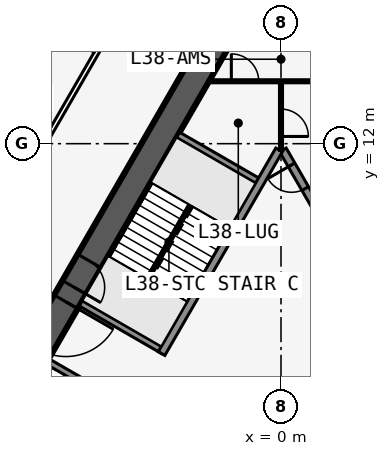
"""IFC4 building model, lengths in metres.
Left out: names, types, materials, properties, quantities, classifications, styles, units other than length and angle.
Written with IfcOpenShell. Run it as: python <this file> out.ifc"""

import sys

from ifc_helpers import new_model, si_unit, direction, frame, frame_2d, origin, place, context, subcontext, project, spatial, rectangle, extrude, element, fill, save


model = new_model("IFC4")
c1 = context("Model", 3, precision=1e-05, world=origin(), true_north=direction((0.0, 1.0)))
c2 = subcontext(c1, "Body", "Model", "MODEL_VIEW")
j1 = project(units=[si_unit("LENGTHUNIT", "METRE"), si_unit("PLANEANGLEUNIT", "RADIAN")], contexts=[c1])
p1 = place(None, origin())
s1 = spatial("IfcSite", under=j1, at=p1, CompositionType="ELEMENT")
p2 = place(p1, origin())
s2 = spatial("IfcBuilding", under=s1, at=p2, CompositionType="ELEMENT")
p3 = place(p2, frame((0.0, 0.0, 145.3)))
s3 = spatial("IfcBuildingStorey", under=s2, at=p3, CompositionType="ELEMENT", Elevation=145.3)
p4 = place(p3, frame((16.5, -9.526, 0.0), z_axis=(0.0, 0.0, 1.0), x_axis=(-0.499999749417, 0.866025548458, 0.0)))
e1 = element("IfcWall", 1, at=p4, inside=s3, PredefinedType="SHEAR", context=c2, shape_type="SweptSolid", body=[
    extrude(rectangle(XDim=33.0, YDim=0.9, at=frame_2d((16.5, 0.0))), origin(), (0.0, 0.0, 1.0), 3.4),
])
p5 = place(p4, frame((14.15, 0.0, 0.0)))
e2 = element("IfcOpeningElement", 2, at=p5, cuts=e1, PredefinedType="OPENING", context=c2, shape_type="SweptSolid", body=[
    extrude(rectangle(XDim=1.8, YDim=2.13, at=frame_2d((0.9, 1.065))), frame((0.0, 0.46, 0.0), z_axis=(0.0, -1.0, 0.0), x_axis=(1.0, 0.0, 0.0)), (0.0, 0.0, 1.0), 0.92),
])
p6 = place(p4, frame((12.6, 0.0, 0.0)))
e3 = element("IfcOpeningElement", 3, at=p6, cuts=e1, PredefinedType="OPENING", context=c2, shape_type="SweptSolid", body=[
    extrude(rectangle(XDim=1.0, YDim=2.13, at=frame_2d((0.5, 1.065))), frame((0.0, 0.46, 0.0), z_axis=(0.0, -1.0, 0.0), x_axis=(1.0, 0.0, 0.0)), (0.0, 0.0, 1.0), 0.92),
])
p7 = place(p3, frame((5.379, 2.586, 0.0), z_axis=(0.0, 0.0, 1.0), x_axis=(-0.500001375892, 0.866024609411, 0.0)))
e4 = element("IfcWall", 4, at=p7, inside=s3, PredefinedType="SOLIDWALL", context=c2, shape_type="SweptSolid", body=[
    extrude(rectangle(XDim=10.633, YDim=0.25, at=frame_2d((5.316, 0.0))), origin(), (0.0, 0.0, 1.0), 3.235),
])
p8 = place(p7, frame((9.164, 0.0, 0.0)))
e5 = element("IfcOpeningElement", 5, at=p8, cuts=e4, PredefinedType="OPENING", context=c2, shape_type="SweptSolid", body=[
    extrude(rectangle(XDim=0.9, YDim=2.13, at=frame_2d((0.45, 1.065))), frame((0.0, 0.135, 0.0), z_axis=(0.0, -1.0, 0.0), x_axis=(1.0, 0.0, 0.0)), (0.0, 0.0, 1.0), 0.27),
])
p9 = place(p7, frame((1.0, 0.0, 0.0)))
e6 = element("IfcOpeningElement", 6, at=p9, cuts=e4, PredefinedType="OPENING", context=c2, shape_type="SweptSolid", body=[
    extrude(rectangle(XDim=1.1, YDim=2.13, at=frame_2d((0.55, 1.065))), frame((0.0, 0.135, 0.0), z_axis=(0.0, -1.0, 0.0), x_axis=(1.0, 0.0, 0.0)), (0.0, 0.0, 1.0), 0.27),
])
p10 = place(p7, frame((3.9, 0.0, 0.0)))
e7 = element("IfcOpeningElement", 7, at=p10, cuts=e4, PredefinedType="OPENING", context=c2, shape_type="SweptSolid", body=[
    extrude(rectangle(XDim=1.1, YDim=2.13, at=frame_2d((0.55, 1.065))), frame((0.0, 0.135, 0.0), z_axis=(0.0, -1.0, 0.0), x_axis=(1.0, 0.0, 0.0)), (0.0, 0.0, 1.0), 0.27),
])
p11 = place(p7, frame((6.8, 0.0, 0.0)))
e8 = element("IfcOpeningElement", 8, at=p11, cuts=e4, PredefinedType="OPENING", context=c2, shape_type="SweptSolid", body=[
    extrude(rectangle(XDim=1.1, YDim=2.13, at=frame_2d((0.55, 1.065))), frame((0.0, 0.135, 0.0), z_axis=(0.0, -1.0, 0.0), x_axis=(1.0, 0.0, 0.0)), (0.0, 0.0, 1.0), 0.27),
])
p12 = place(p3, frame((0.979, 10.207, 0.0), z_axis=(0.0, 0.0, 1.0), x_axis=(0.866022959057, 0.500004234368, 0.0)))
e9 = element("IfcWall", 9, at=p12, inside=s3, PredefinedType="SOLIDWALL", context=c2, shape_type="SweptSolid", body=[
    extrude(rectangle(XDim=3.125, YDim=0.2, at=frame_2d((1.562, 0.0))), origin(), (0.0, 0.0, 1.0), 3.235),
])
p13 = place(p3, frame((0.0, 19.052, 0.0), z_axis=(0.0, 0.0, 1.0), x_axis=(-0.499999749417, -0.866025548458, 0.0)))
e10 = element("IfcWall", 10, at=p13, inside=s3, PredefinedType="SHEAR", context=c2, shape_type="SweptSolid", body=[
    extrude(rectangle(XDim=33.0, YDim=0.9, at=frame_2d((16.5, 0.0))), origin(), (0.0, 0.0, 1.0), 3.4),
])
p14 = place(p13, frame((14.15, 0.0, 0.0)))
e11 = element("IfcOpeningElement", 11, at=p14, cuts=e10, PredefinedType="OPENING", context=c2, shape_type="SweptSolid", body=[
    extrude(rectangle(XDim=1.8, YDim=2.13, at=frame_2d((0.9, 1.065))), frame((0.0, 0.46, 0.0), z_axis=(0.0, -1.0, 0.0), x_axis=(1.0, 0.0, 0.0)), (0.0, 0.0, 1.0), 0.92),
])
p15 = place(p13, frame((12.6, 0.0, 0.0)))
e12 = element("IfcOpeningElement", 12, at=p15, cuts=e10, PredefinedType="OPENING", context=c2, shape_type="SweptSolid", body=[
    extrude(rectangle(XDim=1.0, YDim=2.13, at=frame_2d((0.5, 1.065))), frame((0.0, 0.46, 0.0), z_axis=(0.0, -1.0, 0.0), x_axis=(1.0, 0.0, 0.0)), (0.0, 0.0, 1.0), 0.92),
])
p16 = place(p3, frame((-0.062, 11.794, 0.0), z_axis=(0.0, 0.0, 1.0), x_axis=(-0.500006680225, -0.86602154692, 0.0)))
e13 = element("IfcWall", 13, at=p16, inside=s3, PredefinedType="SOLIDWALL", context=c2, shape_type="SweptSolid", body=[
    extrude(rectangle(XDim=7.733, YDim=0.25, at=frame_2d((3.866, 0.0))), origin(), (0.0, 0.0, 1.0), 3.235),
])
for number, where, z_axis, x_axis in (
    (14, (-0.679, 10.727, 0.0), (0.0, 0.0, 1.0), (-0.866, 0.5, 0.0)),
    (15, (-3.879, 5.184, 0.0), (0.0, 0.0, 1.0), (-0.866, 0.5, 0.0)),
    (16, (-4.979, 3.279, 0.0), (0.0, 0.0, 1.0), (-0.866, 0.5, 0.0)),
):
    element("IfcWall", number, at=place(p3, frame(where, z_axis=z_axis, x_axis=x_axis)), inside=s3, PredefinedType="SOLIDWALL", context=c2, shape_type="SweptSolid", body=[
        extrude(rectangle(XDim=3.125, YDim=0.2, at=frame_2d((1.562, 0.0))), origin(), (0.0, 0.0, 1.0), 3.235),
    ])
p17 = place(p3, frame((20.027, -10.985, 0.0), z_axis=(0.0, 0.0, 1.0), x_axis=(-0.500001677587, 0.866024435227, 0.0)))
e17 = element("IfcWall", 17, at=p17, inside=s3, PredefinedType="PARTITIONING", context=c2, shape_type="SweptSolid", body=[
    extrude(rectangle(XDim=39.054, YDim=0.15, at=frame_2d((19.527, 0.0))), origin(), (0.0, 0.0, 1.0), 3.235),
])
p18 = place(p17, frame((0.352, 0.0, 0.0)))
e18 = element("IfcOpeningElement", 18, at=p18, cuts=e17, PredefinedType="OPENING", context=c2, shape_type="SweptSolid", body=[
    extrude(rectangle(XDim=0.95, YDim=2.13, at=frame_2d((0.475, 1.065))), frame((0.0, 0.085, 0.0), z_axis=(0.0, -1.0, 0.0), x_axis=(1.0, 0.0, 0.0)), (0.0, 0.0, 1.0), 0.17),
])
p19 = place(p17, frame((6.552, 0.0, 0.0)))
e19 = element("IfcOpeningElement", 19, at=p19, cuts=e17, PredefinedType="OPENING", context=c2, shape_type="SweptSolid", body=[
    extrude(rectangle(XDim=0.95, YDim=2.13, at=frame_2d((0.475, 1.065))), frame((0.0, 0.085, 0.0), z_axis=(0.0, -1.0, 0.0), x_axis=(1.0, 0.0, 0.0)), (0.0, 0.0, 1.0), 0.17),
])
p20 = place(p17, frame((17.152, 0.0, 0.0)))
e20 = element("IfcOpeningElement", 20, at=p20, cuts=e17, PredefinedType="OPENING", context=c2, shape_type="SweptSolid", body=[
    extrude(rectangle(XDim=0.95, YDim=2.13, at=frame_2d((0.475, 1.065))), frame((0.0, 0.085, 0.0), z_axis=(0.0, -1.0, 0.0), x_axis=(1.0, 0.0, 0.0)), (0.0, 0.0, 1.0), 0.17),
])
p21 = place(p17, frame((21.552, 0.0, 0.0)))
e21 = element("IfcOpeningElement", 21, at=p21, cuts=e17, PredefinedType="OPENING", context=c2, shape_type="SweptSolid", body=[
    extrude(rectangle(XDim=0.95, YDim=2.13, at=frame_2d((0.475, 1.065))), frame((0.0, 0.085, 0.0), z_axis=(0.0, -1.0, 0.0), x_axis=(1.0, 0.0, 0.0)), (0.0, 0.0, 1.0), 0.17),
])
p22 = place(p17, frame((32.152, 0.0, 0.0)))
e22 = element("IfcOpeningElement", 22, at=p22, cuts=e17, PredefinedType="OPENING", context=c2, shape_type="SweptSolid", body=[
    extrude(rectangle(XDim=0.95, YDim=2.13, at=frame_2d((0.475, 1.065))), frame((0.0, 0.085, 0.0), z_axis=(0.0, -1.0, 0.0), x_axis=(1.0, 0.0, 0.0)), (0.0, 0.0, 1.0), 0.17),
])
p23 = place(p17, frame((37.752, 0.0, 0.0)))
e23 = element("IfcOpeningElement", 23, at=p23, cuts=e17, PredefinedType="OPENING", context=c2, shape_type="SweptSolid", body=[
    extrude(rectangle(XDim=0.95, YDim=2.13, at=frame_2d((0.475, 1.065))), frame((0.0, 0.085, 0.0), z_axis=(0.0, -1.0, 0.0), x_axis=(1.0, 0.0, 0.0)), (0.0, 0.0, 1.0), 0.17),
])
p24 = place(p3, frame((-0.5, 24.636, 0.0), z_axis=(0.0, 0.0, 1.0), x_axis=(-0.500001915564, -0.86602429783, 0.0)))
e24 = element("IfcWall", 24, at=p24, inside=s3, PredefinedType="PARTITIONING", context=c2, shape_type="SweptSolid", body=[
    extrude(rectangle(XDim=42.172, YDim=0.15, at=frame_2d((21.086, 0.0))), origin(), (0.0, 0.0, 1.0), 3.235),
])
p25 = place(p24, frame((1.911, 0.0, 0.0)))
e25 = element("IfcOpeningElement", 25, at=p25, cuts=e24, PredefinedType="OPENING", context=c2, shape_type="SweptSolid", body=[
    extrude(rectangle(XDim=0.95, YDim=2.13, at=frame_2d((0.475, 1.065))), frame((0.0, 0.085, 0.0), z_axis=(0.0, -1.0, 0.0), x_axis=(1.0, 0.0, 0.0)), (0.0, 0.0, 1.0), 0.17),
])
p26 = place(p24, frame((9.311, 0.0, 0.0)))
e26 = element("IfcOpeningElement", 26, at=p26, cuts=e24, PredefinedType="OPENING", context=c2, shape_type="SweptSolid", body=[
    extrude(rectangle(XDim=0.95, YDim=2.13, at=frame_2d((0.475, 1.065))), frame((0.0, 0.085, 0.0), z_axis=(0.0, -1.0, 0.0), x_axis=(1.0, 0.0, 0.0)), (0.0, 0.0, 1.0), 0.17),
])
p27 = place(p24, frame((18.111, 0.0, 0.0)))
e27 = element("IfcOpeningElement", 27, at=p27, cuts=e24, PredefinedType="OPENING", context=c2, shape_type="SweptSolid", body=[
    extrude(rectangle(XDim=0.95, YDim=2.13, at=frame_2d((0.475, 1.065))), frame((0.0, 0.085, 0.0), z_axis=(0.0, -1.0, 0.0), x_axis=(1.0, 0.0, 0.0)), (0.0, 0.0, 1.0), 0.17),
])
p28 = place(p24, frame((29.311, 0.0, 0.0)))
e28 = element("IfcOpeningElement", 28, at=p28, cuts=e24, PredefinedType="OPENING", context=c2, shape_type="SweptSolid", body=[
    extrude(rectangle(XDim=0.95, YDim=2.13, at=frame_2d((0.475, 1.065))), frame((0.0, 0.085, 0.0), z_axis=(0.0, -1.0, 0.0), x_axis=(1.0, 0.0, 0.0)), (0.0, 0.0, 1.0), 0.17),
])
p29 = place(p24, frame((39.311, 0.0, 0.0)))
e29 = element("IfcOpeningElement", 29, at=p29, cuts=e24, PredefinedType="OPENING", context=c2, shape_type="SweptSolid", body=[
    extrude(rectangle(XDim=0.95, YDim=2.13, at=frame_2d((0.475, 1.065))), frame((0.0, 0.085, 0.0), z_axis=(0.0, -1.0, 0.0), x_axis=(1.0, 0.0, 0.0)), (0.0, 0.0, 1.0), 0.17),
])
p30 = place(p3, frame((-2.367, 14.052, 0.0), z_axis=(0.0, 0.0, 1.0), x_axis=(1.0, 0.0, 0.0)))
e30 = element("IfcWall", 30, at=p30, inside=s3, PredefinedType="PARTITIONING", context=c2, shape_type="SweptSolid", body=[
    extrude(rectangle(XDim=4.734, YDim=0.1, at=frame_2d((2.367, 0.0))), origin(), (0.0, 0.0, 1.0), 3.235),
])
p31 = place(p30, frame((0.734, 0.0, 0.0)))
e31 = element("IfcOpeningElement", 31, at=p31, cuts=e30, PredefinedType="OPENING", context=c2, shape_type="SweptSolid", body=[
    extrude(rectangle(XDim=0.9, YDim=2.13, at=frame_2d((0.45, 1.065))), frame((0.0, 0.06, 0.0), z_axis=(0.0, -1.0, 0.0), x_axis=(1.0, 0.0, 0.0)), (0.0, 0.0, 1.0), 0.12),
])
p32 = place(p3, frame((0.0, 14.052, 0.0), z_axis=(0.0, 0.0, 1.0), x_axis=(0.0, -1.0, 0.0)))
e32 = element("IfcWall", 32, at=p32, inside=s3, PredefinedType="PARTITIONING", context=c2, shape_type="SweptSolid", body=[
    extrude(rectangle(XDim=2.275, YDim=0.1, at=frame_2d((1.138, 0.0))), origin(), (0.0, 0.0, 1.0), 3.235),
])
p33 = place(p32, frame((0.915, 0.0, 0.0)))
e33 = element("IfcOpeningElement", 33, at=p33, cuts=e32, PredefinedType="OPENING", context=c2, shape_type="SweptSolid", body=[
    extrude(rectangle(XDim=0.9, YDim=2.13, at=frame_2d((0.45, 1.065))), frame((0.0, 0.06, 0.0), z_axis=(0.0, -1.0, 0.0), x_axis=(1.0, 0.0, 0.0)), (0.0, 0.0, 1.0), 0.12),
])
p34 = place(p3, frame((-2.988, 9.978, 0.0), z_axis=(0.0, 0.0, 1.0), x_axis=(-0.499992232847, -0.866029888106, 0.0)))
e34 = element("IfcWall", 34, at=p34, inside=s3, PredefinedType="SOLIDWALL", context=c2, shape_type="SweptSolid", body=[
    extrude(rectangle(XDim=2.794, YDim=0.1, at=frame_2d((1.397, 0.0))), origin(), (0.0, 0.0, 1.0), 3.4),
])
p35 = place(p14, origin())
e35 = element("IfcDoor", 35, at=p35, inside=s3, OperationType="DOUBLE_DOOR_SINGLE_SWING", PredefinedType="DOOR", context=c2, shape_type="SweptSolid", body=[
    extrude(rectangle(XDim=1.8, YDim=2.13, at=frame_2d((0.9, 1.065))), frame((0.0, 0.025, 0.0), z_axis=(0.0, -1.0, 0.0), x_axis=(1.0, 0.0, 0.0)), (0.0, 0.0, 1.0), 0.05),
])
fill(e11, e35)
p36 = place(p15, origin())
e36 = element("IfcDoor", 36, at=p36, inside=s3, OperationType="SINGLE_SWING_RIGHT", PredefinedType="DOOR", context=c2, shape_type="SweptSolid", body=[
    extrude(rectangle(XDim=1.0, YDim=2.13, at=frame_2d((0.5, 1.065))), frame((0.0, 0.025, 0.0), z_axis=(0.0, -1.0, 0.0), x_axis=(1.0, 0.0, 0.0)), (0.0, 0.0, 1.0), 0.05),
])
fill(e12, e36)
p37 = place(p31, origin())
e37 = element("IfcDoor", 37, at=p37, inside=s3, OperationType="SINGLE_SWING_LEFT", PredefinedType="DOOR", context=c2, shape_type="SweptSolid", body=[
    extrude(rectangle(XDim=0.9, YDim=2.13, at=frame_2d((0.45, 1.065))), frame((0.0, 0.025, 0.0), z_axis=(0.0, -1.0, 0.0), x_axis=(1.0, 0.0, 0.0)), (0.0, 0.0, 1.0), 0.05),
])
fill(e31, e37)
p38 = place(p8, origin())
e38 = element("IfcDoor", 38, at=p38, inside=s3, OperationType="SINGLE_SWING_RIGHT", PredefinedType="DOOR", context=c2, shape_type="SweptSolid", body=[
    extrude(rectangle(XDim=0.9, YDim=2.13, at=frame_2d((0.45, 1.065))), frame((0.0, 0.025, 0.0), z_axis=(0.0, -1.0, 0.0), x_axis=(1.0, 0.0, 0.0)), (0.0, 0.0, 1.0), 0.05),
])
fill(e5, e38)
p39 = place(p33, origin())
e39 = element("IfcDoor", 39, at=p39, inside=s3, OperationType="SINGLE_SWING_RIGHT", PredefinedType="DOOR", context=c2, shape_type="SweptSolid", body=[
    extrude(rectangle(XDim=0.9, YDim=2.13, at=frame_2d((0.45, 1.065))), frame((0.0, 0.025, 0.0), z_axis=(0.0, -1.0, 0.0), x_axis=(1.0, 0.0, 0.0)), (0.0, 0.0, 1.0), 0.05),
])
fill(e33, e39)
save(model, sys.argv[1])
